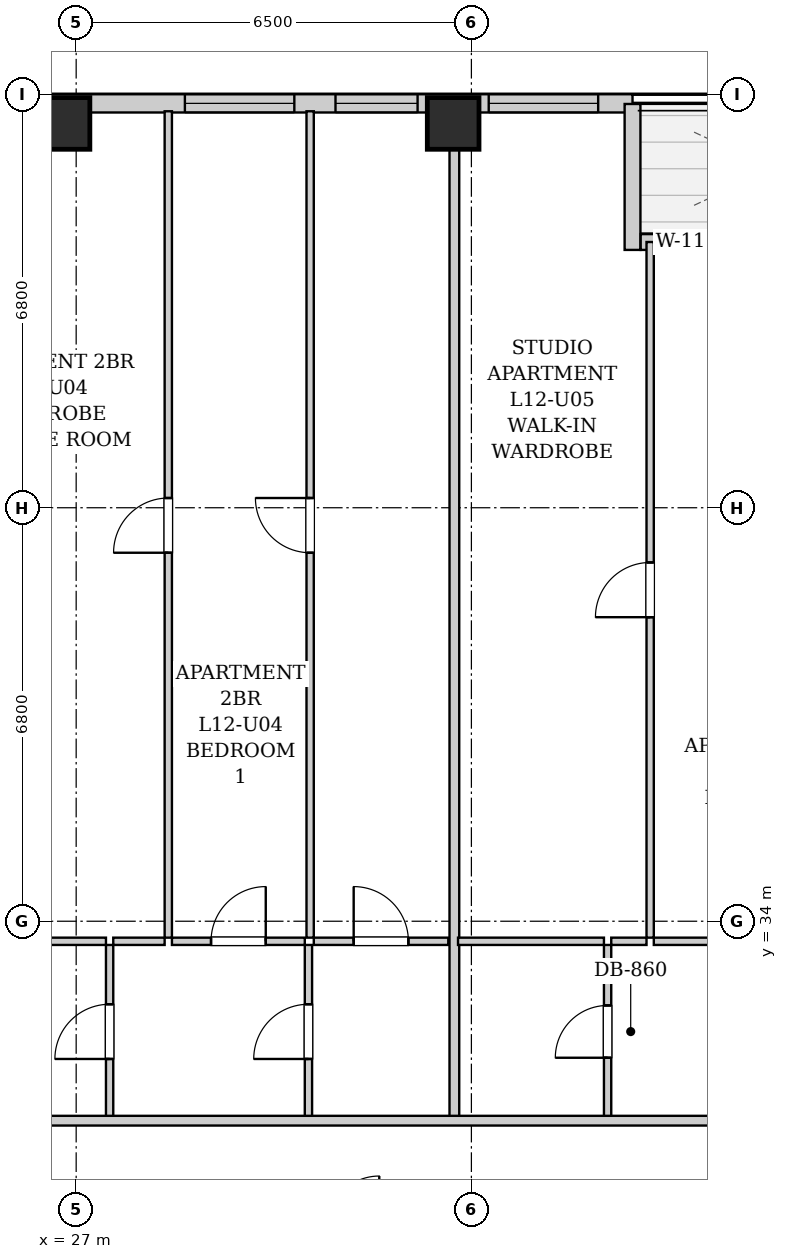
"""IFC4 building model, lengths in metres.
Left out: names, types, materials, properties, quantities, classifications, styles, units other than length and angle.
Written with IfcOpenShell. Run it as: python <this file> out.ifc"""

import sys

from ifc_helpers import new_model, si_unit, direction, frame, frame_2d, origin, origin_2d, place, context, subcontext, project, spatial, rectangle, extrude, element, fill, save


model = new_model("IFC4")
c1 = context("Model", 3, precision=1e-05, world=origin(), true_north=direction((0.0, 1.0)))
c2 = subcontext(c1, "Body", "Model", "MODEL_VIEW")
j1 = project(units=[si_unit("LENGTHUNIT", "METRE"), si_unit("PLANEANGLEUNIT", "RADIAN")], contexts=[c1])
p1 = place(None, origin())
s1 = spatial("IfcSite", under=j1, at=p1, CompositionType="ELEMENT")
p2 = place(p1, origin())
s2 = spatial("IfcBuilding", under=s1, at=p2, CompositionType="ELEMENT")
p3 = place(p2, frame((0.0, 0.0, 48.2)))
s3 = spatial("IfcBuildingStorey", under=s2, at=p3, CompositionType="ELEMENT", Elevation=48.2)
for number, where, z_axis, x_axis in (
    (1, (26.8, 47.12, 0.0), (0.0, 0.0, 1.0), (1.0, 0.0, 0.0)),
    (2, (33.2, 47.12, 0.0), (0.0, 0.0, 1.0), (1.0, 0.0, 0.0)),
):
    element("IfcColumn", number, at=place(p3, frame(where, z_axis=z_axis, x_axis=x_axis)), inside=s3, PredefinedType="COLUMN", context=c2, shape_type="SweptSolid", body=[
        extrude(rectangle(XDim=0.85, YDim=0.85, at=origin_2d()), origin(), (0.0, 0.0, 1.0), 3.2),
    ])
p4 = place(p3, frame((10.0, 47.45, 0.0), z_axis=(0.0, 0.0, 1.0), x_axis=(1.0, 0.0, 0.0)))
e3 = element("IfcWall", 3, at=p4, inside=s3, PredefinedType="SOLIDWALL", context=c2, shape_type="SweptSolid", body=[
    extrude(rectangle(XDim=26.15, YDim=0.3, at=frame_2d((13.075, 0.0))), origin(), (0.0, 0.0, 1.0), 1.975),
])
p5 = place(p4, frame((5.862, 0.0, 0.55)))
e4 = element("IfcOpeningElement", 4, at=p5, cuts=e3, PredefinedType="OPENING", context=c2, shape_type="SweptSolid", body=[
    extrude(rectangle(XDim=1.35, YDim=1.2, at=frame_2d((0.675, 0.6))), frame((0.0, 0.16, 0.0), z_axis=(0.0, -1.0, 0.0), x_axis=(1.0, 0.0, 0.0)), (0.0, 0.0, 1.0), 0.32),
])
p6 = place(p4, frame((8.944, 0.0, 0.55)))
e5 = element("IfcOpeningElement", 5, at=p6, cuts=e3, PredefinedType="OPENING", context=c2, shape_type="SweptSolid", body=[
    extrude(rectangle(XDim=1.8, YDim=1.2, at=frame_2d((0.9, 0.6))), frame((0.0, 0.16, 0.0), z_axis=(0.0, -1.0, 0.0), x_axis=(1.0, 0.0, 0.0)), (0.0, 0.0, 1.0), 0.32),
])
p7 = place(p4, frame((18.788, 0.0, 0.55)))
e6 = element("IfcOpeningElement", 6, at=p7, cuts=e3, PredefinedType="OPENING", context=c2, shape_type="SweptSolid", body=[
    extrude(rectangle(XDim=1.8, YDim=1.2, at=frame_2d((0.9, 0.6))), frame((0.0, 0.16, 0.0), z_axis=(0.0, -1.0, 0.0), x_axis=(1.0, 0.0, 0.0)), (0.0, 0.0, 1.0), 0.32),
])
p8 = place(p4, frame((21.265, 0.0, 0.55)))
e7 = element("IfcOpeningElement", 7, at=p8, cuts=e3, PredefinedType="OPENING", context=c2, shape_type="SweptSolid", body=[
    extrude(rectangle(XDim=1.35, YDim=1.2, at=frame_2d((0.675, 0.6))), frame((0.0, 0.16, 0.0), z_axis=(0.0, -1.0, 0.0), x_axis=(1.0, 0.0, 0.0)), (0.0, 0.0, 1.0), 0.32),
])
p9 = place(p4, frame((23.785, 0.0, 0.55)))
e8 = element("IfcOpeningElement", 8, at=p9, cuts=e3, PredefinedType="OPENING", context=c2, shape_type="SweptSolid", body=[
    extrude(rectangle(XDim=1.8, YDim=1.2, at=frame_2d((0.9, 0.6))), frame((0.0, 0.16, 0.0), z_axis=(0.0, -1.0, 0.0), x_axis=(1.0, 0.0, 0.0)), (0.0, 0.0, 1.0), 0.32),
])
p10 = place(p3, frame((36.15, 47.44, 0.0), z_axis=(0.0, 0.0, 1.0), x_axis=(0.0, -1.0, 0.0)))
e9 = element("IfcWall", 9, at=p10, inside=s3, PredefinedType="SOLIDWALL", context=c2, shape_type="SweptSolid", body=[
    extrude(rectangle(XDim=2.4, YDim=0.26, at=frame_2d((1.2, 0.0))), origin(), (0.0, 0.0, 1.0), 2.94),
])
p11 = place(p3, frame((36.284, 45.17, 0.0), z_axis=(0.0, 0.0, 1.0), x_axis=(1.0, 0.0, 0.0)))
e10 = element("IfcWall", 10, at=p11, inside=s3, PredefinedType="SOLIDWALL", context=c2, shape_type="SweptSolid", body=[
    extrude(rectangle(XDim=4.332, YDim=0.26, at=frame_2d((2.166, 0.0))), origin(), (0.0, 0.0, 1.0), 2.94),
])
p12 = place(p11, frame((1.616, 0.0, 0.0)))
e11 = element("IfcOpeningElement", 11, at=p12, cuts=e10, PredefinedType="OPENING", context=c2, shape_type="SweptSolid", body=[
    extrude(rectangle(XDim=1.1, YDim=2.0, at=frame_2d((0.55, 1.0))), frame((0.0, 0.14, 0.0), z_axis=(0.0, -1.0, 0.0), x_axis=(1.0, 0.0, 0.0)), (0.0, 0.0, 1.0), 0.28),
])
p13 = place(p11, frame((0.606, 0.0, 0.55)))
e12 = element("IfcOpeningElement", 12, at=p13, cuts=e10, PredefinedType="OPENING", context=c2, shape_type="SweptSolid", body=[
    extrude(rectangle(XDim=0.85, YDim=1.2, at=frame_2d((0.425, 0.6))), frame((0.0, 0.14, 0.0), z_axis=(0.0, -1.0, 0.0), x_axis=(1.0, 0.0, 0.0)), (0.0, 0.0, 1.0), 0.28),
])
p14 = place(p3, frame((27.55, 30.76, 0.0), z_axis=(0.0, 0.0, 1.0), x_axis=(0.0, 1.0, 0.0)))
e13 = element("IfcWall", 13, at=p14, inside=s3, PredefinedType="PARTITIONING", context=c2, shape_type="SweptSolid", body=[
    extrude(rectangle(XDim=2.85, YDim=0.12, at=frame_2d((1.425, 0.0))), origin(), (0.0, 0.0, 1.0), 2.94),
])
p15 = place(p14, frame((0.975, 0.0, 0.0)))
e14 = element("IfcOpeningElement", 14, at=p15, cuts=e13, PredefinedType="OPENING", context=c2, shape_type="SweptSolid", body=[
    extrude(rectangle(XDim=0.9, YDim=2.05, at=frame_2d((0.45, 1.025))), frame((0.0, 0.07, 0.0), z_axis=(0.0, -1.0, 0.0), x_axis=(1.0, 0.0, 0.0)), (0.0, 0.0, 1.0), 0.14),
])
p16 = place(p3, frame((24.493, 33.67, 0.0), z_axis=(0.0, 0.0, 1.0), x_axis=(1.0, 0.0, 0.0)))
e15 = element("IfcWall", 15, at=p16, inside=s3, PredefinedType="PARTITIONING", context=c2, shape_type="SweptSolid", body=[
    extrude(rectangle(XDim=2.997, YDim=0.12, at=frame_2d((1.499, 0.0))), origin(), (0.0, 0.0, 1.0), 2.94),
])
p17 = place(p16, frame((1.048, 0.0, 0.0)))
e16 = element("IfcOpeningElement", 16, at=p17, cuts=e15, PredefinedType="OPENING", context=c2, shape_type="SweptSolid", body=[
    extrude(rectangle(XDim=0.9, YDim=2.05, at=frame_2d((0.45, 1.025))), frame((0.0, 0.07, 0.0), z_axis=(0.0, -1.0, 0.0), x_axis=(1.0, 0.0, 0.0)), (0.0, 0.0, 1.0), 0.14),
])
p18 = place(p3, frame((30.82, 30.76, 0.0), z_axis=(0.0, 0.0, 1.0), x_axis=(0.0, 1.0, 0.0)))
e17 = element("IfcWall", 17, at=p18, inside=s3, PredefinedType="PARTITIONING", context=c2, shape_type="SweptSolid", body=[
    extrude(rectangle(XDim=2.85, YDim=0.12, at=frame_2d((1.425, 0.0))), origin(), (0.0, 0.0, 1.0), 2.94),
])
p19 = place(p18, frame((0.975, 0.0, 0.0)))
e18 = element("IfcOpeningElement", 18, at=p19, cuts=e17, PredefinedType="OPENING", context=c2, shape_type="SweptSolid", body=[
    extrude(rectangle(XDim=0.9, YDim=2.05, at=frame_2d((0.45, 1.025))), frame((0.0, 0.07, 0.0), z_axis=(0.0, -1.0, 0.0), x_axis=(1.0, 0.0, 0.0)), (0.0, 0.0, 1.0), 0.14),
])
p20 = place(p3, frame((27.61, 33.67, 0.0), z_axis=(0.0, 0.0, 1.0), x_axis=(1.0, 0.0, 0.0)))
e19 = element("IfcWall", 19, at=p20, inside=s3, PredefinedType="PARTITIONING", context=c2, shape_type="SweptSolid", body=[
    extrude(rectangle(XDim=0.845, YDim=0.12, at=frame_2d((0.422, 0.0))), origin(), (0.0, 0.0, 1.0), 2.94),
])
p21 = place(p3, frame((28.575, 33.67, 0.0), z_axis=(0.0, 0.0, 1.0), x_axis=(1.0, 0.0, 0.0)))
e20 = element("IfcWall", 20, at=p21, inside=s3, PredefinedType="PARTITIONING", context=c2, shape_type="SweptSolid", body=[
    extrude(rectangle(XDim=2.185, YDim=0.12, at=frame_2d((1.093, 0.0))), origin(), (0.0, 0.0, 1.0), 2.94),
])
p22 = place(p21, frame((0.643, 0.0, 0.0)))
e21 = element("IfcOpeningElement", 21, at=p22, cuts=e20, PredefinedType="OPENING", context=c2, shape_type="SweptSolid", body=[
    extrude(rectangle(XDim=0.9, YDim=2.05, at=frame_2d((0.45, 1.025))), frame((0.0, 0.07, 0.0), z_axis=(0.0, -1.0, 0.0), x_axis=(1.0, 0.0, 0.0)), (0.0, 0.0, 1.0), 0.14),
])
p23 = place(p3, frame((30.908, 33.67, 0.0), z_axis=(0.0, 0.0, 1.0), x_axis=(1.0, 0.0, 0.0)))
e22 = element("IfcWall", 22, at=p23, inside=s3, PredefinedType="PARTITIONING", context=c2, shape_type="SweptSolid", body=[
    extrude(rectangle(XDim=2.212, YDim=0.12, at=frame_2d((1.106, 0.0))), origin(), (0.0, 0.0, 1.0), 2.94),
])
p24 = place(p23, frame((0.656, 0.0, 0.0)))
e23 = element("IfcOpeningElement", 23, at=p24, cuts=e22, PredefinedType="OPENING", context=c2, shape_type="SweptSolid", body=[
    extrude(rectangle(XDim=0.9, YDim=2.05, at=frame_2d((0.45, 1.025))), frame((0.0, 0.07, 0.0), z_axis=(0.0, -1.0, 0.0), x_axis=(1.0, 0.0, 0.0)), (0.0, 0.0, 1.0), 0.14),
])
p25 = place(p3, frame((28.515, 33.73, 0.0), z_axis=(0.0, 0.0, 1.0), x_axis=(0.0, 1.0, 0.0)))
e24 = element("IfcWall", 24, at=p25, inside=s3, PredefinedType="PARTITIONING", context=c2, shape_type="SweptSolid", body=[
    extrude(rectangle(XDim=13.59, YDim=0.12, at=frame_2d((6.795, 0.0))), origin(), (0.0, 0.0, 1.0), 2.94),
])
p26 = place(p25, frame((6.33, 0.0, 0.0)))
e25 = element("IfcOpeningElement", 25, at=p26, cuts=e24, PredefinedType="OPENING", context=c2, shape_type="SweptSolid", body=[
    extrude(rectangle(XDim=0.9, YDim=2.05, at=frame_2d((0.45, 1.025))), frame((0.0, 0.07, 0.0), z_axis=(0.0, -1.0, 0.0), x_axis=(1.0, 0.0, 0.0)), (0.0, 0.0, 1.0), 0.14),
])
p27 = place(p3, frame((30.848, 33.73, 0.0), z_axis=(0.0, 0.0, 1.0), x_axis=(0.0, 1.0, 0.0)))
e26 = element("IfcWall", 26, at=p27, inside=s3, PredefinedType="PARTITIONING", context=c2, shape_type="SweptSolid", body=[
    extrude(rectangle(XDim=13.59, YDim=0.12, at=frame_2d((6.795, 0.0))), origin(), (0.0, 0.0, 1.0), 2.94),
])
p28 = place(p27, frame((6.33, 0.0, 0.0)))
e27 = element("IfcOpeningElement", 27, at=p28, cuts=e26, PredefinedType="OPENING", context=c2, shape_type="SweptSolid", body=[
    extrude(rectangle(XDim=0.9, YDim=2.05, at=frame_2d((0.45, 1.025))), frame((0.0, 0.07, 0.0), z_axis=(0.0, -1.0, 0.0), x_axis=(1.0, 0.0, 0.0)), (0.0, 0.0, 1.0), 0.14),
])
p29 = place(p3, frame((33.22, 30.76, 0.0), z_axis=(0.0, 0.0, 1.0), x_axis=(0.0, 1.0, 0.0)))
e28 = element("IfcWall", 28, at=p29, inside=s3, PredefinedType="PARTITIONING", context=c2, shape_type="SweptSolid", body=[
    extrude(rectangle(XDim=16.56, YDim=0.16, at=frame_2d((8.28, 0.0))), origin(), (0.0, 0.0, 1.0), 2.232),
])
p30 = place(p3, frame((35.74, 30.76, 0.0), z_axis=(0.0, 0.0, 1.0), x_axis=(0.0, 1.0, 0.0)))
e29 = element("IfcWall", 29, at=p30, inside=s3, PredefinedType="PARTITIONING", context=c2, shape_type="SweptSolid", body=[
    extrude(rectangle(XDim=2.85, YDim=0.12, at=frame_2d((1.425, 0.0))), origin(), (0.0, 0.0, 1.0), 2.94),
])
p31 = place(p30, frame((0.995, 0.0, 0.0)))
e30 = element("IfcOpeningElement", 30, at=p31, cuts=e29, PredefinedType="OPENING", context=c2, shape_type="SweptSolid", body=[
    extrude(rectangle(XDim=0.86, YDim=2.05, at=frame_2d((0.43, 1.025))), frame((0.0, 0.07, 0.0), z_axis=(0.0, -1.0, 0.0), x_axis=(1.0, 0.0, 0.0)), (0.0, 0.0, 1.0), 0.14),
])
p32 = place(p3, frame((33.28, 33.67, 0.0), z_axis=(0.0, 0.0, 1.0), x_axis=(1.0, 0.0, 0.0)))
e31 = element("IfcWall", 31, at=p32, inside=s3, PredefinedType="PARTITIONING", context=c2, shape_type="SweptSolid", body=[
    extrude(rectangle(XDim=2.4, YDim=0.12, at=frame_2d((1.2, 0.0))), origin(), (0.0, 0.0, 1.0), 2.94),
])
p33 = place(p3, frame((35.8, 33.67, 0.0), z_axis=(0.0, 0.0, 1.0), x_axis=(1.0, 0.0, 0.0)))
e32 = element("IfcWall", 32, at=p33, inside=s3, PredefinedType="PARTITIONING", context=c2, shape_type="SweptSolid", body=[
    extrude(rectangle(XDim=0.58, YDim=0.12, at=frame_2d((0.29, 0.0))), origin(), (0.0, 0.0, 1.0), 2.94),
])
p34 = place(p3, frame((36.5, 33.67, 0.0), z_axis=(0.0, 0.0, 1.0), x_axis=(1.0, 0.0, 0.0)))
e33 = element("IfcWall", 33, at=p34, inside=s3, PredefinedType="PARTITIONING", context=c2, shape_type="SweptSolid", body=[
    extrude(rectangle(XDim=3.1, YDim=0.12, at=frame_2d((1.55, 0.0))), origin(), (0.0, 0.0, 1.0), 2.94),
])
p35 = place(p34, frame((1.1, 0.0, 0.0)))
e34 = element("IfcOpeningElement", 34, at=p35, cuts=e33, PredefinedType="OPENING", context=c2, shape_type="SweptSolid", body=[
    extrude(rectangle(XDim=0.9, YDim=2.05, at=frame_2d((0.45, 1.025))), frame((0.0, 0.07, 0.0), z_axis=(0.0, -1.0, 0.0), x_axis=(1.0, 0.0, 0.0)), (0.0, 0.0, 1.0), 0.14),
])
p36 = place(p3, frame((36.44, 33.73, 0.0), z_axis=(0.0, 0.0, 1.0), x_axis=(0.0, 1.0, 0.0)))
e35 = element("IfcWall", 35, at=p36, inside=s3, PredefinedType="PARTITIONING", context=c2, shape_type="SweptSolid", body=[
    extrude(rectangle(XDim=11.44, YDim=0.12, at=frame_2d((5.72, 0.0))), origin(), (0.0, 0.0, 1.0), 2.94),
])
p37 = place(p36, frame((5.27, 0.0, 0.0)))
e36 = element("IfcOpeningElement", 36, at=p37, cuts=e35, PredefinedType="OPENING", context=c2, shape_type="SweptSolid", body=[
    extrude(rectangle(XDim=0.9, YDim=2.05, at=frame_2d((0.45, 1.025))), frame((0.0, 0.07, 0.0), z_axis=(0.0, -1.0, 0.0), x_axis=(1.0, 0.0, 0.0)), (0.0, 0.0, 1.0), 0.14),
])
p38 = place(p3, frame((10.05, 30.72, 0.0), z_axis=(0.0, 0.0, 1.0), x_axis=(1.0, 0.0, 0.0)))
e37 = element("IfcWall", 37, at=p38, inside=s3, PredefinedType="PARTITIONING", context=c2, shape_type="SweptSolid", body=[
    extrude(rectangle(XDim=33.9, YDim=0.16, at=frame_2d((16.95, 0.0))), origin(), (0.0, 0.0, 1.0), 2.94),
])
p39 = place(p38, frame((4.165, 0.0, 0.0)))
e38 = element("IfcOpeningElement", 38, at=p39, cuts=e37, PredefinedType="OPENING", context=c2, shape_type="SweptSolid", body=[
    extrude(rectangle(XDim=0.95, YDim=2.1, at=frame_2d((0.475, 1.05))), frame((0.0, 0.09, 0.0), z_axis=(0.0, -1.0, 0.0), x_axis=(1.0, 0.0, 0.0)), (0.0, 0.0, 1.0), 0.18),
])
p40 = place(p38, frame((27.495, 0.0, 0.0)))
e39 = element("IfcOpeningElement", 39, at=p40, cuts=e37, PredefinedType="OPENING", context=c2, shape_type="SweptSolid", body=[
    extrude(rectangle(XDim=0.95, YDim=2.1, at=frame_2d((0.475, 1.05))), frame((0.0, 0.09, 0.0), z_axis=(0.0, -1.0, 0.0), x_axis=(1.0, 0.0, 0.0)), (0.0, 0.0, 1.0), 0.18),
])
p41 = place(p15, origin())
e40 = element("IfcDoor", 40, at=p41, inside=s3, OperationType="SINGLE_SWING_LEFT", PredefinedType="DOOR", context=c2, shape_type="SweptSolid", body=[
    extrude(rectangle(XDim=0.9, YDim=2.05, at=frame_2d((0.45, 1.025))), frame((0.0, 0.025, 0.0), z_axis=(0.0, -1.0, 0.0), x_axis=(1.0, 0.0, 0.0)), (0.0, 0.0, 1.0), 0.05),
])
fill(e14, e40)
p42 = place(p19, origin())
e41 = element("IfcDoor", 41, at=p42, inside=s3, OperationType="SINGLE_SWING_LEFT", PredefinedType="DOOR", context=c2, shape_type="SweptSolid", body=[
    extrude(rectangle(XDim=0.9, YDim=2.05, at=frame_2d((0.45, 1.025))), frame((0.0, 0.025, 0.0), z_axis=(0.0, -1.0, 0.0), x_axis=(1.0, 0.0, 0.0)), (0.0, 0.0, 1.0), 0.05),
])
fill(e18, e41)
p43 = place(p22, origin())
e42 = element("IfcDoor", 42, at=p43, inside=s3, OperationType="SINGLE_SWING_RIGHT", PredefinedType="DOOR", context=c2, shape_type="SweptSolid", body=[
    extrude(rectangle(XDim=0.9, YDim=2.05, at=frame_2d((0.45, 1.025))), frame((0.0, 0.025, 0.0), z_axis=(0.0, -1.0, 0.0), x_axis=(1.0, 0.0, 0.0)), (0.0, 0.0, 1.0), 0.05),
])
fill(e21, e42)
p44 = place(p24, origin())
e43 = element("IfcDoor", 43, at=p44, inside=s3, OperationType="SINGLE_SWING_LEFT", PredefinedType="DOOR", context=c2, shape_type="SweptSolid", body=[
    extrude(rectangle(XDim=0.9, YDim=2.05, at=frame_2d((0.45, 1.025))), frame((0.0, 0.025, 0.0), z_axis=(0.0, -1.0, 0.0), x_axis=(1.0, 0.0, 0.0)), (0.0, 0.0, 1.0), 0.05),
])
fill(e23, e43)
p45 = place(p26, origin())
e44 = element("IfcDoor", 44, at=p45, inside=s3, OperationType="SINGLE_SWING_LEFT", PredefinedType="DOOR", context=c2, shape_type="SweptSolid", body=[
    extrude(rectangle(XDim=0.9, YDim=2.05, at=frame_2d((0.45, 1.025))), frame((0.0, 0.025, 0.0), z_axis=(0.0, -1.0, 0.0), x_axis=(1.0, 0.0, 0.0)), (0.0, 0.0, 1.0), 0.05),
])
fill(e25, e44)
p46 = place(p28, origin())
e45 = element("IfcDoor", 45, at=p46, inside=s3, OperationType="SINGLE_SWING_RIGHT", PredefinedType="DOOR", context=c2, shape_type="SweptSolid", body=[
    extrude(rectangle(XDim=0.9, YDim=2.05, at=frame_2d((0.45, 1.025))), frame((0.0, 0.025, 0.0), z_axis=(0.0, -1.0, 0.0), x_axis=(1.0, 0.0, 0.0)), (0.0, 0.0, 1.0), 0.05),
])
fill(e27, e45)
p47 = place(p31, origin())
e46 = element("IfcDoor", 46, at=p47, inside=s3, OperationType="SINGLE_SWING_LEFT", PredefinedType="DOOR", context=c2, shape_type="SweptSolid", body=[
    extrude(rectangle(XDim=0.86, YDim=2.05, at=frame_2d((0.43, 1.025))), frame((0.0, 0.025, 0.0), z_axis=(0.0, -1.0, 0.0), x_axis=(1.0, 0.0, 0.0)), (0.0, 0.0, 1.0), 0.05),
])
fill(e30, e46)
p48 = place(p37, origin())
e47 = element("IfcDoor", 47, at=p48, inside=s3, OperationType="SINGLE_SWING_LEFT", PredefinedType="DOOR", context=c2, shape_type="SweptSolid", body=[
    extrude(rectangle(XDim=0.9, YDim=2.05, at=frame_2d((0.45, 1.025))), frame((0.0, 0.025, 0.0), z_axis=(0.0, -1.0, 0.0), x_axis=(1.0, 0.0, 0.0)), (0.0, 0.0, 1.0), 0.05),
])
fill(e36, e47)
p49 = place(p7, origin())
e48 = element("IfcWindow", 48, at=p49, inside=s3, PartitioningType="DOUBLE_PANEL_VERTICAL", PredefinedType="WINDOW", context=c2, shape_type="SweptSolid", body=[
    extrude(rectangle(XDim=1.8, YDim=1.2, at=frame_2d((0.9, 0.6))), frame((0.0, 0.03, 0.0), z_axis=(0.0, -1.0, 0.0), x_axis=(1.0, 0.0, 0.0)), (0.0, 0.0, 1.0), 0.06),
])
fill(e6, e48)
p50 = place(p8, origin())
e49 = element("IfcWindow", 49, at=p50, inside=s3, PartitioningType="SINGLE_PANEL", PredefinedType="WINDOW", context=c2, shape_type="SweptSolid", body=[
    extrude(rectangle(XDim=1.35, YDim=1.2, at=frame_2d((0.675, 0.6))), frame((0.0, 0.03, 0.0), z_axis=(0.0, -1.0, 0.0), x_axis=(1.0, 0.0, 0.0)), (0.0, 0.0, 1.0), 0.06),
])
fill(e7, e49)
p51 = place(p9, origin())
e50 = element("IfcWindow", 50, at=p51, inside=s3, PartitioningType="DOUBLE_PANEL_VERTICAL", PredefinedType="WINDOW", context=c2, shape_type="SweptSolid", body=[
    extrude(rectangle(XDim=1.8, YDim=1.2, at=frame_2d((0.9, 0.6))), frame((0.0, 0.03, 0.0), z_axis=(0.0, -1.0, 0.0), x_axis=(1.0, 0.0, 0.0)), (0.0, 0.0, 1.0), 0.06),
])
fill(e8, e50)
p52 = place(p13, origin())
e51 = element("IfcWindow", 51, at=p52, inside=s3, PartitioningType="SINGLE_PANEL", PredefinedType="WINDOW", context=c2, shape_type="SweptSolid", body=[
    extrude(rectangle(XDim=0.85, YDim=1.2, at=frame_2d((0.425, 0.6))), frame((0.0, 0.03, 0.0), z_axis=(0.0, -1.0, 0.0), x_axis=(1.0, 0.0, 0.0)), (0.0, 0.0, 1.0), 0.06),
])
fill(e12, e51)
save(model, sys.argv[1])
